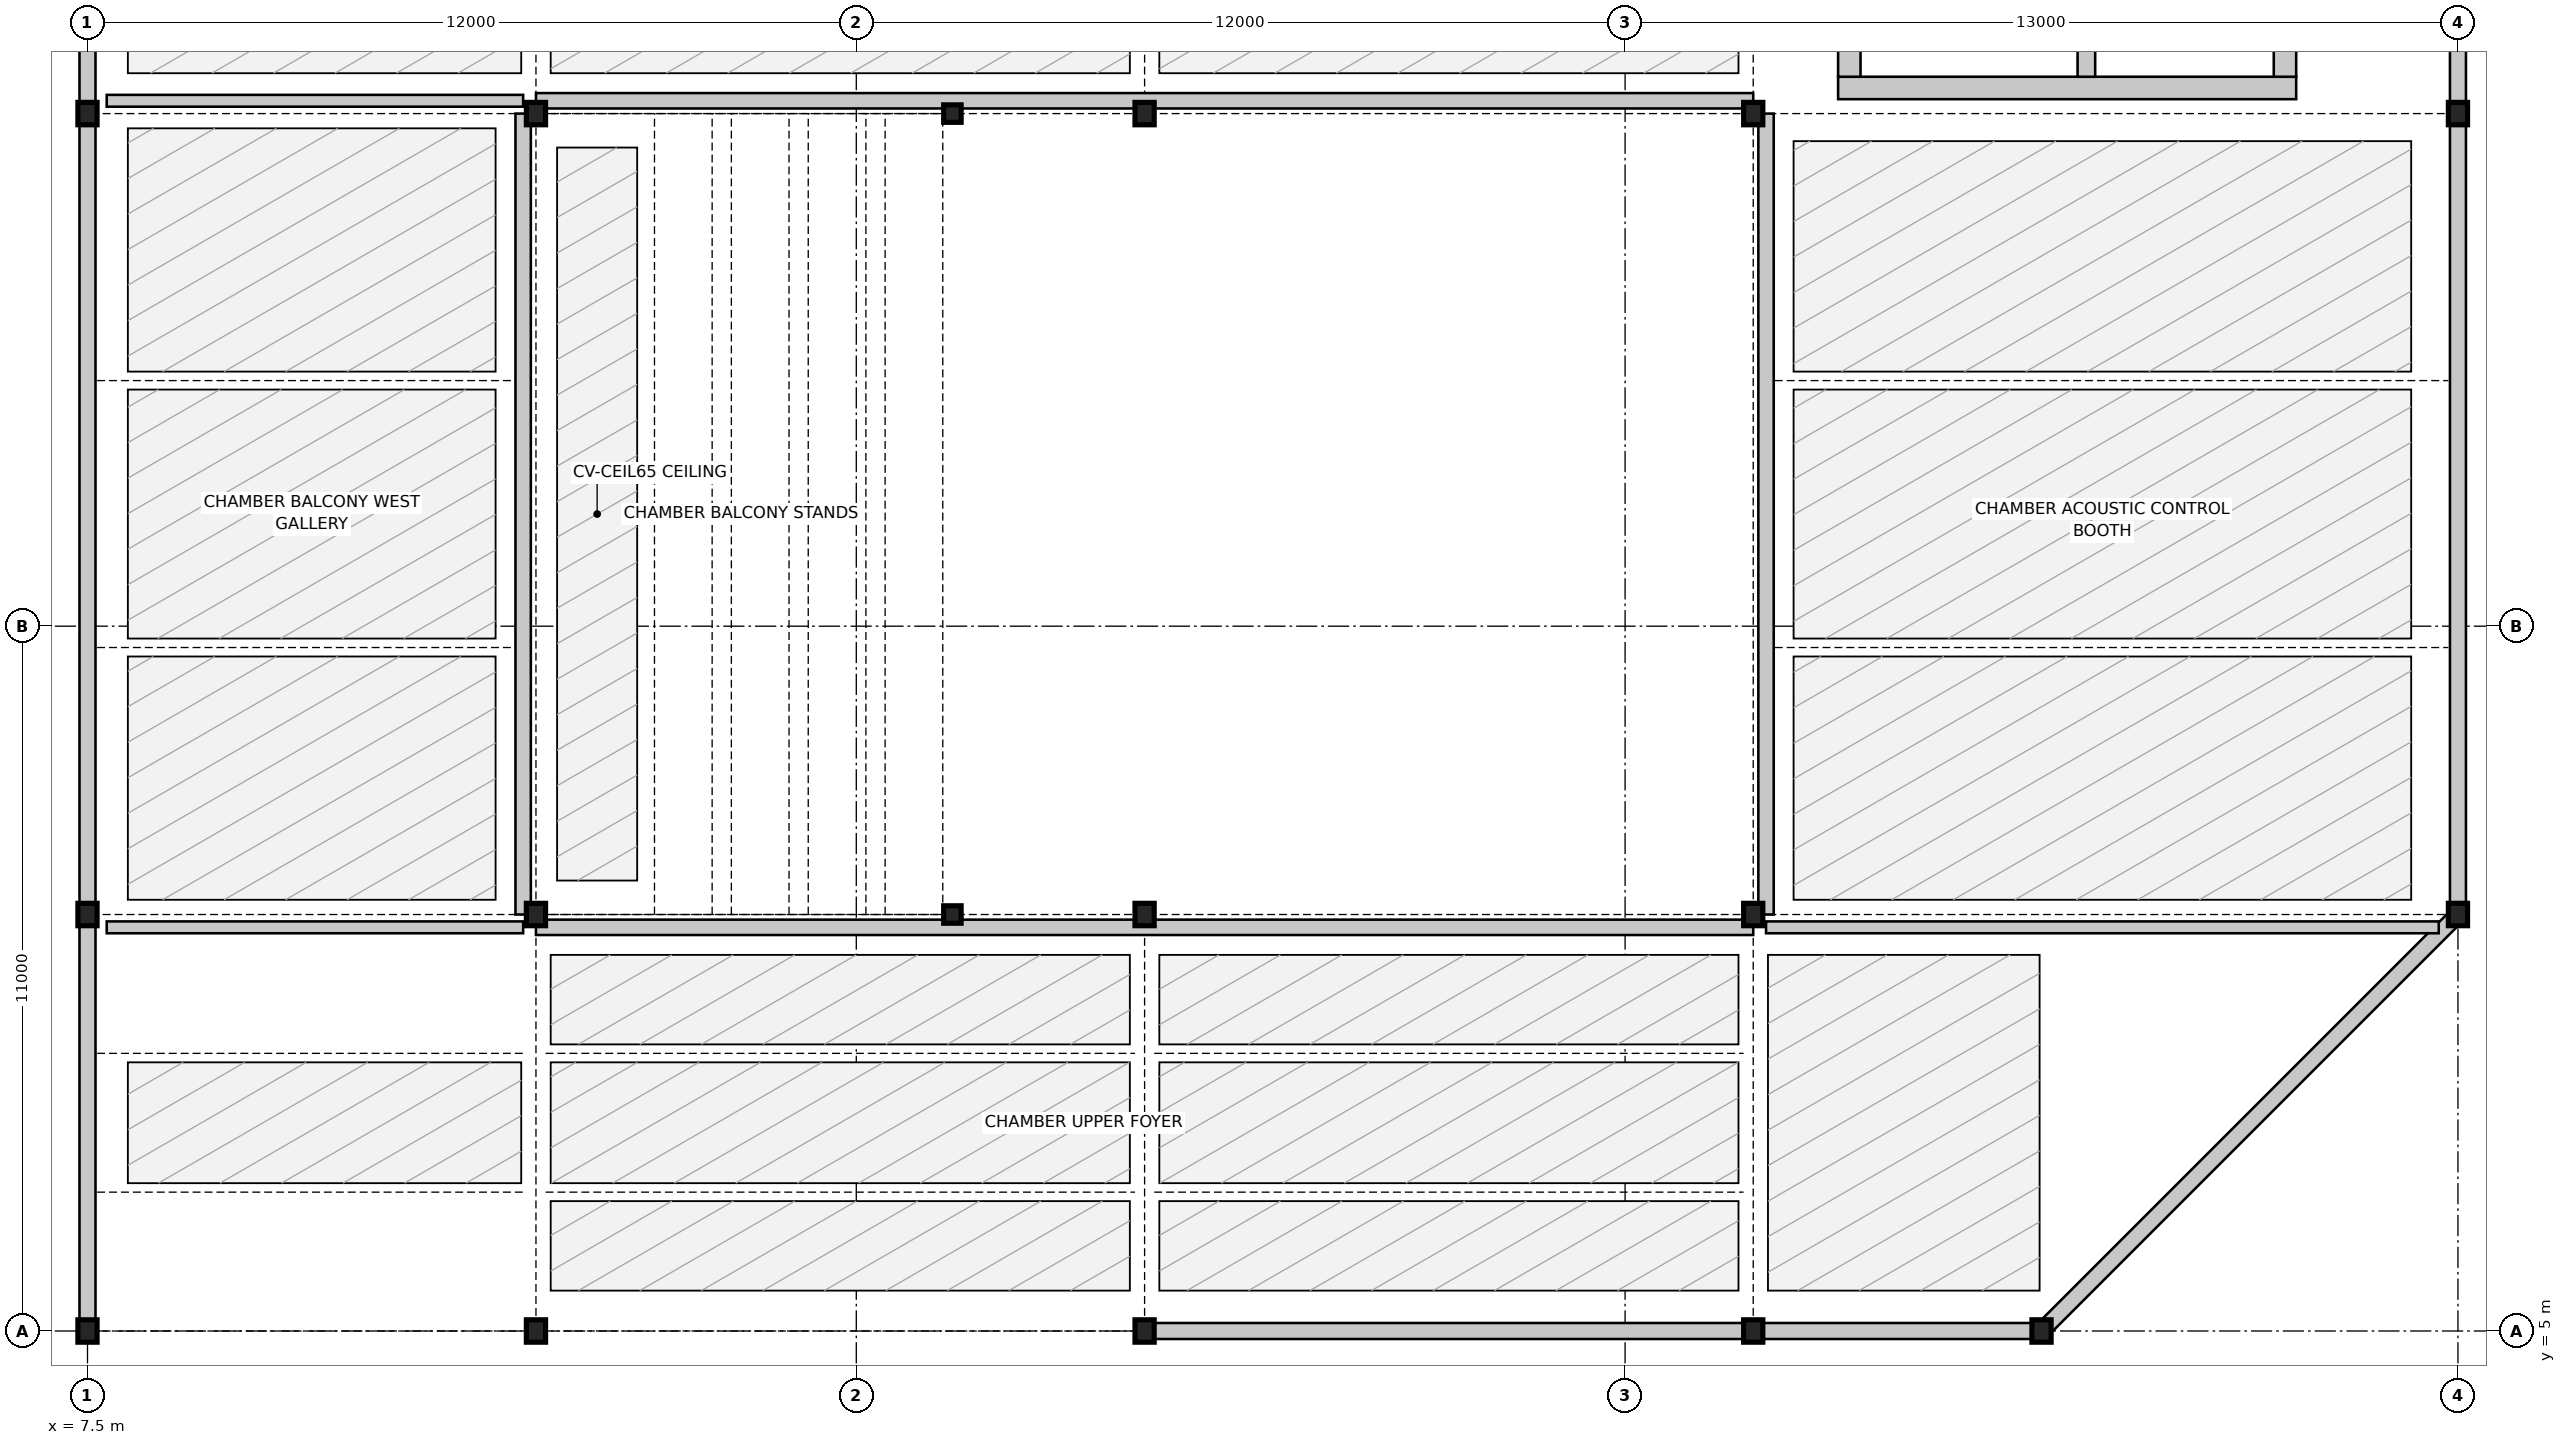
"""IFC4 building model, lengths in metres.
Left out: names, types, materials, properties, quantities, classifications, styles, units other than length and angle.
Written with IfcOpenShell. Run it as: python <this file> out.ifc"""

import sys

from ifc_helpers import new_model, si_unit, direction, frame, frame_2d, origin, origin_2d, place, context, subcontext, project, spatial, rectangle, hollow_circle, i_section, extrude, element, fill, save


model = new_model("IFC4")
c1 = context("Model", 3, precision=1e-05, world=origin(), true_north=direction((0.0, 1.0)))
c2 = subcontext(c1, "Body", "Model", "MODEL_VIEW")
j1 = project(units=[si_unit("LENGTHUNIT", "METRE"), si_unit("PLANEANGLEUNIT", "RADIAN")], contexts=[c1])
p1 = place(None, origin())
s1 = spatial("IfcSite", under=j1, at=p1, CompositionType="ELEMENT")
p2 = place(p1, origin())
s2 = spatial("IfcBuilding", under=s1, at=p2, CompositionType="ELEMENT")
p3 = place(p2, frame((0.0, 0.0, 4.8)))
s3 = spatial("IfcBuildingStorey", under=s2, at=p3, CompositionType="ELEMENT", Elevation=4.8)
for number, where, z_axis, x_axis in (
    (1, (7.5, 5.0, 0.0), (0.0, 0.0, 1.0), (1.0, 0.0, 0.0)),
    (2, (14.5, 5.0, 0.0), (0.0, 0.0, 1.0), (1.0, 0.0, 0.0)),
    (3, (24.0, 5.0, 0.0), (0.0, 0.0, 1.0), (1.0, 0.0, 0.0)),
    (4, (33.5, 5.0, 0.0), (0.0, 0.0, 1.0), (1.0, 0.0, 0.0)),
    (5, (38.0, 5.0, 0.0), (0.0, 0.0, 1.0), (1.0, 0.0, 0.0)),
    (6, (44.5, 11.5, 0.0), (0.0, 0.0, 1.0), (1.0, 0.0, 0.0)),
    (7, (44.5, 24.0, 0.0), (0.0, 0.0, 1.0), (1.0, 0.0, 0.0)),
    (8, (7.5, 24.0, 0.0), (0.0, 0.0, 1.0), (1.0, 0.0, 0.0)),
    (9, (7.5, 11.5, 0.0), (0.0, 0.0, 1.0), (1.0, 0.0, 0.0)),
    (10, (14.5, 11.5, 0.0), (0.0, 0.0, 1.0), (1.0, 0.0, 0.0)),
    (11, (24.0, 11.5, 0.0), (0.0, 0.0, 1.0), (1.0, 0.0, 0.0)),
    (12, (33.5, 11.5, 0.0), (0.0, 0.0, 1.0), (1.0, 0.0, 0.0)),
    (13, (14.5, 24.0, 0.0), (0.0, 0.0, 1.0), (1.0, 0.0, 0.0)),
    (14, (24.0, 24.0, 0.0), (0.0, 0.0, 1.0), (1.0, 0.0, 0.0)),
    (15, (33.5, 24.0, 0.0), (0.0, 0.0, 1.0), (1.0, 0.0, 0.0)),
):
    element("IfcColumn", number, at=place(p3, frame(where, z_axis=z_axis, x_axis=x_axis)), inside=s3, PredefinedType="COLUMN", context=c2, shape_type="SweptSolid", body=[
        extrude(i_section(OverallWidth=0.3, OverallDepth=0.35, WebThickness=0.01, FlangeThickness=0.018, FilletRadius=0.027, at=origin_2d()), origin(), (0.0, 0.0, 1.0), 4.8),
    ])
for number, where, z_axis, x_axis in (
    (16, (21.0, 11.5, 0.0), (0.0, 0.0, 1.0), (1.0, 0.0, 0.0)),
    (17, (21.0, 24.0, 0.0), (0.0, 0.0, 1.0), (1.0, 0.0, 0.0)),
):
    element("IfcColumn", number, at=place(p3, frame(where, z_axis=z_axis, x_axis=x_axis)), inside=s3, PredefinedType="COLUMN", context=c2, shape_type="SweptSolid", body=[
        extrude(hollow_circle(Radius=0.136, WallThickness=0.016, at=origin_2d()), origin(), (0.0, 0.0, 1.0), 0.96),
    ])
p4 = place(p3, frame((33.48, 5.0, 0.0), z_axis=(0.0, 0.0, 1.0), x_axis=(-1.0, 0.0, 0.0)))
e18 = element("IfcWall", 18, at=p4, inside=s3, PredefinedType="SOLIDWALL", context=c2, shape_type="SweptSolid", body=[
    extrude(rectangle(XDim=9.46, YDim=0.25, at=frame_2d((4.73, 0.0))), origin(), (0.0, 0.0, 1.0), 4.028),
])
p5 = place(p3, frame((37.98, 5.0, 0.0), z_axis=(0.0, 0.0, 1.0), x_axis=(-1.0, 0.0, 0.0)))
e19 = element("IfcWall", 19, at=p5, inside=s3, PredefinedType="SOLIDWALL", context=c2, shape_type="SweptSolid", body=[
    extrude(rectangle(XDim=4.46, YDim=0.25, at=frame_2d((2.23, 0.0))), origin(), (0.0, 0.0, 1.0), 4.028),
])
p6 = place(p3, frame((44.486, 11.486, 0.0), z_axis=(0.0, 0.0, 1.0), x_axis=(-0.707106781187, -0.707106781187, 0.0)))
e20 = element("IfcWall", 20, at=p6, inside=s3, PredefinedType="SOLIDWALL", context=c2, shape_type="SweptSolid", body=[
    extrude(rectangle(XDim=9.152, YDim=0.25, at=frame_2d((4.576, 0.0))), origin(), (0.0, 0.0, 1.0), 4.028),
])
p7 = place(p3, frame((44.5, 23.98, 0.0), z_axis=(0.0, 0.0, 1.0), x_axis=(0.0, -1.0, 0.0)))
e21 = element("IfcWall", 21, at=p7, inside=s3, PredefinedType="SOLIDWALL", context=c2, shape_type="SweptSolid", body=[
    extrude(rectangle(XDim=12.46, YDim=0.25, at=frame_2d((6.23, 0.0))), origin(), (0.0, 0.0, 1.0), 4.028),
])
p8 = place(p7, frame((4.88, 0.0, 0.85)))
e22 = element("IfcOpeningElement", 22, at=p8, cuts=e21, PredefinedType="OPENING", context=c2, shape_type="SweptSolid", body=[
    extrude(rectangle(XDim=2.7, YDim=1.7, at=frame_2d((1.35, 0.85))), frame((0.0, 0.135, 0.0), z_axis=(0.0, -1.0, 0.0), x_axis=(1.0, 0.0, 0.0)), (0.0, 0.0, 1.0), 0.27),
])
p9 = place(p3, frame((44.5, 29.98, 0.0), z_axis=(0.0, 0.0, 1.0), x_axis=(0.0, -1.0, 0.0)))
e23 = element("IfcWall", 23, at=p9, inside=s3, PredefinedType="SOLIDWALL", context=c2, shape_type="SweptSolid", body=[
    extrude(rectangle(XDim=5.96, YDim=0.25, at=frame_2d((2.98, 0.0))), origin(), (0.0, 0.0, 1.0), 4.078),
])
p10 = place(p3, frame((7.5, 24.02, 0.0), z_axis=(0.0, 0.0, 1.0), x_axis=(0.0, 1.0, 0.0)))
e24 = element("IfcWall", 24, at=p10, inside=s3, PredefinedType="SOLIDWALL", context=c2, shape_type="SweptSolid", body=[
    extrude(rectangle(XDim=13.96, YDim=0.25, at=frame_2d((6.98, 0.0))), origin(), (0.0, 0.0, 1.0), 4.078),
])
p11 = place(p3, frame((7.5, 11.52, 0.0), z_axis=(0.0, 0.0, 1.0), x_axis=(0.0, 1.0, 0.0)))
e25 = element("IfcWall", 25, at=p11, inside=s3, PredefinedType="SOLIDWALL", context=c2, shape_type="SweptSolid", body=[
    extrude(rectangle(XDim=12.46, YDim=0.25, at=frame_2d((6.23, 0.0))), origin(), (0.0, 0.0, 1.0), 4.078),
])
p12 = place(p11, frame((4.88, 0.0, 0.85)))
e26 = element("IfcOpeningElement", 26, at=p12, cuts=e25, PredefinedType="OPENING", context=c2, shape_type="SweptSolid", body=[
    extrude(rectangle(XDim=2.7, YDim=1.7, at=frame_2d((1.35, 0.85))), frame((0.0, 0.135, 0.0), z_axis=(0.0, -1.0, 0.0), x_axis=(1.0, 0.0, 0.0)), (0.0, 0.0, 1.0), 0.27),
])
p13 = place(p3, frame((7.5, 5.02, 0.0), z_axis=(0.0, 0.0, 1.0), x_axis=(0.0, 1.0, 0.0)))
e27 = element("IfcWall", 27, at=p13, inside=s3, PredefinedType="SOLIDWALL", context=c2, shape_type="SweptSolid", body=[
    extrude(rectangle(XDim=6.46, YDim=0.25, at=frame_2d((3.23, 0.0))), origin(), (0.0, 0.0, 1.0), 4.078),
])
p14 = place(p3, frame((34.825, 24.4, 0.0), z_axis=(0.0, 0.0, 1.0), x_axis=(1.0, 0.0, 0.0)))
e28 = element("IfcWall", 28, at=p14, inside=s3, PredefinedType="SHEAR", context=c2, shape_type="SweptSolid", body=[
    extrude(rectangle(XDim=7.15, YDim=0.35, at=frame_2d((3.575, 0.0))), origin(), (0.0, 0.0, 1.0), 4.54),
])
for number, where, z_axis, x_axis in (
    (29, (35.0, 24.575, 0.0), (0.0, 0.0, 1.0), (0.0, 1.0, 0.0)),
    (30, (41.8, 24.575, 0.0), (0.0, 0.0, 1.0), (0.0, 1.0, 0.0)),
):
    element("IfcWall", number, at=place(p3, frame(where, z_axis=z_axis, x_axis=x_axis)), inside=s3, PredefinedType="SHEAR", context=c2, shape_type="SweptSolid", body=[
        extrude(rectangle(XDim=11.2, YDim=0.35, at=frame_2d((5.6, 0.0))), origin(), (0.0, 0.0, 1.0), 4.54),
    ])
p15 = place(p3, frame((38.7, 24.575, 0.0), z_axis=(0.0, 0.0, 1.0), x_axis=(0.0, 1.0, 0.0)))
e31 = element("IfcWall", 31, at=p15, inside=s3, PredefinedType="SHEAR", context=c2, shape_type="SweptSolid", body=[
    extrude(rectangle(XDim=6.637, YDim=0.275, at=frame_2d((3.319, 0.0))), origin(), (0.0, 0.0, 1.0), 4.54),
])
p16 = place(p3, frame((7.8, 11.3, 0.0), z_axis=(0.0, 0.0, 1.0), x_axis=(1.0, 0.0, 0.0)))
e32 = element("IfcWall", 32, at=p16, inside=s3, PredefinedType="PARTITIONING", context=c2, shape_type="SweptSolid", body=[
    extrude(rectangle(XDim=6.5, YDim=0.185, at=frame_2d((3.25, 0.0))), origin(), (0.0, 0.0, 1.0), 4.08),
])
p17 = place(p16, frame((2.7, 0.0, 0.0)))
e33 = element("IfcOpeningElement", 33, at=p17, cuts=e32, PredefinedType="OPENING", context=c2, shape_type="SweptSolid", body=[
    extrude(rectangle(XDim=1.1, YDim=2.15, at=frame_2d((0.55, 1.075))), frame((0.0, 0.103, 0.0), z_axis=(0.0, -1.0, 0.0), x_axis=(1.0, 0.0, 0.0)), (0.0, 0.0, 1.0), 0.205),
])
p18 = place(p3, frame((14.5, 11.3, 0.0), z_axis=(0.0, 0.0, 1.0), x_axis=(1.0, 0.0, 0.0)))
e34 = element("IfcWall", 34, at=p18, inside=s3, PredefinedType="PARTITIONING", context=c2, shape_type="SweptSolid", body=[
    extrude(rectangle(XDim=19.0, YDim=0.24, at=frame_2d((9.5, 0.0))), origin(), (0.0, 0.0, 1.0), 4.08),
])
p19 = place(p3, frame((33.7, 11.3, 0.0), z_axis=(0.0, 0.0, 1.0), x_axis=(1.0, 0.0, 0.0)))
e35 = element("IfcWall", 35, at=p19, inside=s3, PredefinedType="PARTITIONING", context=c2, shape_type="SweptSolid", body=[
    extrude(rectangle(XDim=10.5, YDim=0.185, at=frame_2d((5.25, 0.0))), origin(), (0.0, 0.0, 1.0), 4.03),
])
p20 = place(p19, frame((4.7, 0.0, 0.0)))
e36 = element("IfcOpeningElement", 36, at=p20, cuts=e35, PredefinedType="OPENING", context=c2, shape_type="SweptSolid", body=[
    extrude(rectangle(XDim=1.1, YDim=2.15, at=frame_2d((0.55, 1.075))), frame((0.0, 0.103, 0.0), z_axis=(0.0, -1.0, 0.0), x_axis=(1.0, 0.0, 0.0)), (0.0, 0.0, 1.0), 0.205),
])
p21 = place(p3, frame((14.3, 11.5, 0.0), z_axis=(0.0, 0.0, 1.0), x_axis=(0.0, 1.0, 0.0)))
e37 = element("IfcWall", 37, at=p21, inside=s3, PredefinedType="PARTITIONING", context=c2, shape_type="SweptSolid", body=[
    extrude(rectangle(XDim=12.5, YDim=0.24, at=frame_2d((6.25, 0.0))), origin(), (0.0, 0.0, 1.0), 4.08),
])
p22 = place(p21, frame((5.425, 0.0, 0.0)))
e38 = element("IfcOpeningElement", 38, at=p22, cuts=e37, PredefinedType="OPENING", context=c2, shape_type="SweptSolid", body=[
    extrude(rectangle(XDim=1.65, YDim=2.2, at=frame_2d((0.825, 1.1))), frame((0.0, 0.13, 0.0), z_axis=(0.0, -1.0, 0.0), x_axis=(1.0, 0.0, 0.0)), (0.0, 0.0, 1.0), 0.26),
])
p23 = place(p3, frame((33.7, 11.5, 0.0), z_axis=(0.0, 0.0, 1.0), x_axis=(0.0, 1.0, 0.0)))
e39 = element("IfcWall", 39, at=p23, inside=s3, PredefinedType="PARTITIONING", context=c2, shape_type="SweptSolid", body=[
    extrude(rectangle(XDim=12.5, YDim=0.24, at=frame_2d((6.25, 0.0))), origin(), (0.0, 0.0, 1.0), 4.08),
])
p24 = place(p3, frame((7.8, 24.2, 0.0), z_axis=(0.0, 0.0, 1.0), x_axis=(1.0, 0.0, 0.0)))
e40 = element("IfcWall", 40, at=p24, inside=s3, PredefinedType="PARTITIONING", context=c2, shape_type="SweptSolid", body=[
    extrude(rectangle(XDim=6.5, YDim=0.185, at=frame_2d((3.25, 0.0))), origin(), (0.0, 0.0, 1.0), 4.08),
])
p25 = place(p24, frame((2.7, 0.0, 0.0)))
e41 = element("IfcOpeningElement", 41, at=p25, cuts=e40, PredefinedType="OPENING", context=c2, shape_type="SweptSolid", body=[
    extrude(rectangle(XDim=1.1, YDim=2.15, at=frame_2d((0.55, 1.075))), frame((0.0, 0.103, 0.0), z_axis=(0.0, -1.0, 0.0), x_axis=(1.0, 0.0, 0.0)), (0.0, 0.0, 1.0), 0.205),
])
p26 = place(p3, frame((14.5, 24.2, 0.0), z_axis=(0.0, 0.0, 1.0), x_axis=(1.0, 0.0, 0.0)))
e42 = element("IfcWall", 42, at=p26, inside=s3, PredefinedType="PARTITIONING", context=c2, shape_type="SweptSolid", body=[
    extrude(rectangle(XDim=19.0, YDim=0.24, at=frame_2d((9.5, 0.0))), origin(), (0.0, 0.0, 1.0), 4.08),
])
p27 = place(p8, origin())
e43 = element("IfcWindow", 43, at=p27, inside=s3, PartitioningType="SINGLE_PANEL", PredefinedType="WINDOW", context=c2, shape_type="SweptSolid", body=[
    extrude(rectangle(XDim=2.7, YDim=1.7, at=frame_2d((1.35, 0.85))), frame((0.0, 0.03, 0.0), z_axis=(0.0, -1.0, 0.0), x_axis=(1.0, 0.0, 0.0)), (0.0, 0.0, 1.0), 0.06),
])
fill(e22, e43)
p28 = place(p12, origin())
e44 = element("IfcWindow", 44, at=p28, inside=s3, PartitioningType="SINGLE_PANEL", PredefinedType="WINDOW", context=c2, shape_type="SweptSolid", body=[
    extrude(rectangle(XDim=2.7, YDim=1.7, at=frame_2d((1.35, 0.85))), frame((0.0, 0.03, 0.0), z_axis=(0.0, -1.0, 0.0), x_axis=(1.0, 0.0, 0.0)), (0.0, 0.0, 1.0), 0.06),
])
fill(e26, e44)
p29 = place(p17, origin())
e45 = element("IfcDoor", 45, at=p29, inside=s3, OperationType="SINGLE_SWING_LEFT", PredefinedType="DOOR", context=c2, shape_type="SweptSolid", body=[
    extrude(rectangle(XDim=1.1, YDim=2.15, at=frame_2d((0.55, 1.075))), frame((0.0, 0.025, 0.0), z_axis=(0.0, -1.0, 0.0), x_axis=(1.0, 0.0, 0.0)), (0.0, 0.0, 1.0), 0.05),
])
fill(e33, e45)
p30 = place(p20, origin())
e46 = element("IfcDoor", 46, at=p30, inside=s3, OperationType="SINGLE_SWING_RIGHT", PredefinedType="DOOR", context=c2, shape_type="SweptSolid", body=[
    extrude(rectangle(XDim=1.1, YDim=2.15, at=frame_2d((0.55, 1.075))), frame((0.0, 0.025, 0.0), z_axis=(0.0, -1.0, 0.0), x_axis=(1.0, 0.0, 0.0)), (0.0, 0.0, 1.0), 0.05),
])
fill(e36, e46)
p31 = place(p22, origin())
e47 = element("IfcDoor", 47, at=p31, inside=s3, OperationType="SINGLE_SWING_LEFT", PredefinedType="DOOR", context=c2, shape_type="SweptSolid", body=[
    extrude(rectangle(XDim=1.65, YDim=2.2, at=frame_2d((0.825, 1.1))), frame((0.0, 0.025, 0.0), z_axis=(0.0, -1.0, 0.0), x_axis=(1.0, 0.0, 0.0)), (0.0, 0.0, 1.0), 0.05),
])
fill(e38, e47)
p32 = place(p25, origin())
e48 = element("IfcDoor", 48, at=p32, inside=s3, OperationType="SINGLE_SWING_RIGHT", PredefinedType="DOOR", context=c2, shape_type="SweptSolid", body=[
    extrude(rectangle(XDim=1.1, YDim=2.15, at=frame_2d((0.55, 1.075))), frame((0.0, 0.025, 0.0), z_axis=(0.0, -1.0, 0.0), x_axis=(1.0, 0.0, 0.0)), (0.0, 0.0, 1.0), 0.05),
])
fill(e41, e48)
save(model, sys.argv[1])
